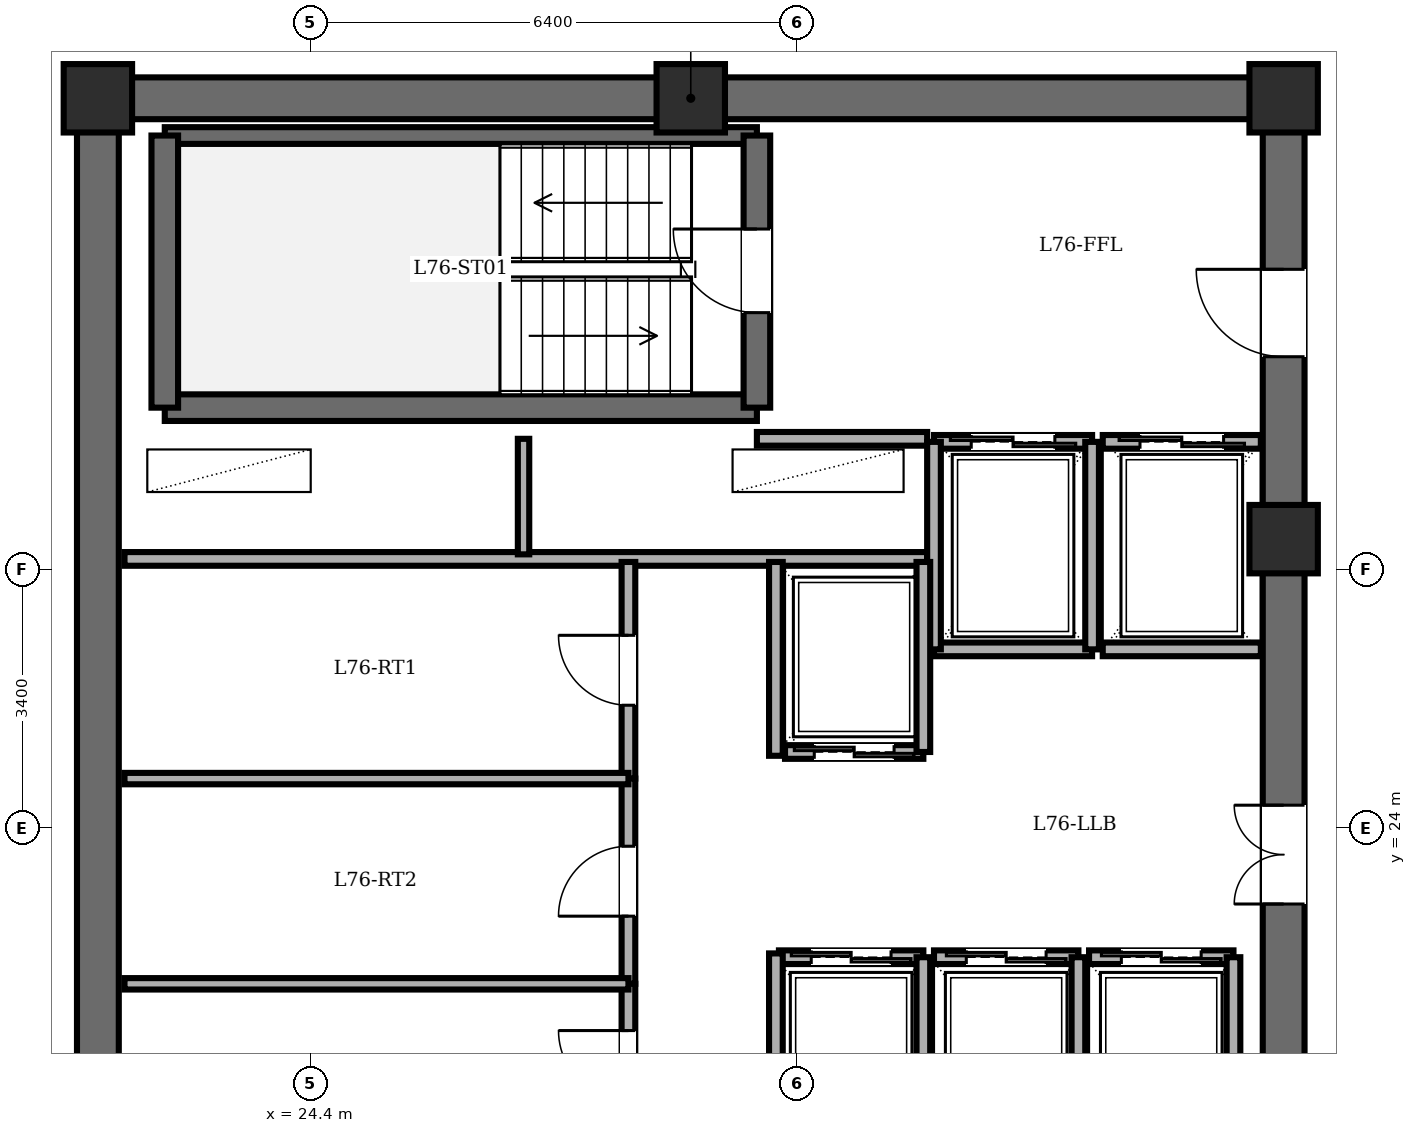
"""IFC4 building model, lengths in metres.
Left out: names, types, materials, properties, quantities, classifications, styles, units other than length and angle.
Written with IfcOpenShell. Run it as: python <this file> out.ifc"""

import sys

from ifc_helpers import new_model, si_unit, direction, frame, frame_2d, origin, origin_2d, place, context, subcontext, project, spatial, rectangle, extrude, element, fill, save


model = new_model("IFC4")
c1 = context("Model", 3, precision=1e-05, world=origin(), true_north=direction((0.0, 1.0)))
c2 = subcontext(c1, "Body", "Model", "MODEL_VIEW")
j1 = project(units=[si_unit("LENGTHUNIT", "METRE"), si_unit("PLANEANGLEUNIT", "RADIAN")], contexts=[c1])
p1 = place(None, origin())
s1 = spatial("IfcSite", under=j1, at=p1, CompositionType="ELEMENT")
p2 = place(p1, origin())
s2 = spatial("IfcBuilding", under=s1, at=p2, CompositionType="ELEMENT")
p3 = place(p2, frame((0.0, 0.0, 291.65)))
s3 = spatial("IfcBuildingStorey", under=s2, at=p3, CompositionType="ELEMENT", Elevation=291.65)
for number, where, z_axis, x_axis in (
    (1, (37.2, 27.8, 0.0), (0.0, 0.0, 1.0), (1.0, 0.0, 0.0)),
    (2, (37.2, 33.6, 0.0), (0.0, 0.0, 1.0), (1.0, 0.0, 0.0)),
    (3, (29.4, 33.6, 0.0), (0.0, 0.0, 1.0), (1.0, 0.0, 0.0)),
    (4, (21.6, 33.6, 0.0), (0.0, 0.0, 1.0), (1.0, 0.0, 0.0)),
):
    element("IfcColumn", number, at=place(p3, frame(where, z_axis=z_axis, x_axis=x_axis)), inside=s3, PredefinedType="COLUMN", context=c2, shape_type="SweptSolid", body=[
        extrude(rectangle(XDim=0.9, YDim=0.9, at=origin_2d()), origin(), (0.0, 0.0, 1.0), 3.65),
    ])
p4 = place(p3, frame((21.6, 14.4, 0.0), z_axis=(0.0, 0.0, 1.0), x_axis=(0.0, 1.0, 0.0)))
e5 = element("IfcWall", 5, at=p4, inside=s3, PredefinedType="SHEAR", context=c2, shape_type="SweptSolid", body=[
    extrude(rectangle(XDim=19.2, YDim=0.55, at=frame_2d((9.6, 0.0))), origin(), (0.0, 0.0, 1.0), 3.41),
])
p5 = place(p3, frame((21.6, 33.6, 0.0), z_axis=(0.0, 0.0, 1.0), x_axis=(1.0, 0.0, 0.0)))
e6 = element("IfcWall", 6, at=p5, inside=s3, PredefinedType="SHEAR", context=c2, shape_type="SweptSolid", body=[
    extrude(rectangle(XDim=15.6, YDim=0.55, at=frame_2d((7.8, 0.0))), origin(), (0.0, 0.0, 1.0), 3.41),
])
p6 = place(p3, frame((37.2, 14.4, 0.0), z_axis=(0.0, 0.0, 1.0), x_axis=(0.0, 1.0, 0.0)))
e7 = element("IfcWall", 7, at=p6, inside=s3, PredefinedType="SHEAR", context=c2, shape_type="SweptSolid", body=[
    extrude(rectangle(XDim=19.2, YDim=0.55, at=frame_2d((9.6, 0.0))), origin(), (0.0, 0.0, 1.0), 3.41),
])
p7 = place(p6, frame((15.8, 0.0, 0.0)))
e8 = element("IfcOpeningElement", 8, at=p7, cuts=e7, PredefinedType="OPENING", context=c2, shape_type="SweptSolid", body=[
    extrude(rectangle(XDim=1.15, YDim=2.15, at=frame_2d((0.575, 1.075))), frame((0.0, 0.285, 0.0), z_axis=(0.0, -1.0, 0.0), x_axis=(1.0, 0.0, 0.0)), (0.0, 0.0, 1.0), 0.57),
])
p8 = place(p6, frame((3.6, 0.0, 0.0)))
e9 = element("IfcOpeningElement", 9, at=p8, cuts=e7, PredefinedType="OPENING", context=c2, shape_type="SweptSolid", body=[
    extrude(rectangle(XDim=1.1, YDim=2.15, at=frame_2d((0.55, 1.075))), frame((0.0, 0.285, 0.0), z_axis=(0.0, -1.0, 0.0), x_axis=(1.0, 0.0, 0.0)), (0.0, 0.0, 1.0), 0.57),
])
p9 = place(p6, frame((8.6, 0.0, 0.0)))
e10 = element("IfcOpeningElement", 10, at=p9, cuts=e7, PredefinedType="OPENING", context=c2, shape_type="SweptSolid", body=[
    extrude(rectangle(XDim=1.3, YDim=2.2, at=frame_2d((0.65, 1.1))), frame((0.0, 0.285, 0.0), z_axis=(0.0, -1.0, 0.0), x_axis=(1.0, 0.0, 0.0)), (0.0, 0.0, 1.0), 0.57),
])
p10 = place(p3, frame((22.48, 29.53, 0.0), z_axis=(0.0, 0.0, 1.0), x_axis=(1.0, 0.0, 0.0)))
e11 = element("IfcWall", 11, at=p10, inside=s3, PredefinedType="SOLIDWALL", context=c2, shape_type="SweptSolid", body=[
    extrude(rectangle(XDim=7.79, YDim=0.35, at=frame_2d((3.895, 0.0))), origin(), (0.0, 0.0, 1.0), 3.41),
])
p11 = place(p3, frame((22.48, 33.11, 0.0), z_axis=(0.0, 0.0, 1.0), x_axis=(1.0, 0.0, 0.0)))
e12 = element("IfcWall", 12, at=p11, inside=s3, PredefinedType="PARTITIONING", context=c2, shape_type="SweptSolid", body=[
    extrude(rectangle(XDim=7.79, YDim=0.22, at=frame_2d((3.895, 0.0))), origin(), (0.0, 0.0, 1.0), 3.41),
])
p12 = place(p3, frame((22.48, 29.53, 0.0), z_axis=(0.0, 0.0, 1.0), x_axis=(0.0, 1.0, 0.0)))
e13 = element("IfcWall", 13, at=p12, inside=s3, PredefinedType="SOLIDWALL", context=c2, shape_type="SweptSolid", body=[
    extrude(rectangle(XDim=3.58, YDim=0.35, at=frame_2d((1.79, 0.0))), origin(), (0.0, 0.0, 1.0), 3.41),
])
p13 = place(p3, frame((30.27, 29.53, 0.0), z_axis=(0.0, 0.0, 1.0), x_axis=(0.0, 1.0, 0.0)))
e14 = element("IfcWall", 14, at=p13, inside=s3, PredefinedType="SOLIDWALL", context=c2, shape_type="SweptSolid", body=[
    extrude(rectangle(XDim=3.58, YDim=0.35, at=frame_2d((1.79, 0.0))), origin(), (0.0, 0.0, 1.0), 3.41),
])
p14 = place(p13, frame((1.25, 0.0, 0.0)))
e15 = element("IfcOpeningElement", 15, at=p14, cuts=e14, PredefinedType="OPENING", context=c2, shape_type="SweptSolid", body=[
    extrude(rectangle(XDim=1.1, YDim=2.15, at=frame_2d((0.55, 1.075))), frame((0.0, 0.185, 0.0), z_axis=(0.0, -1.0, 0.0), x_axis=(1.0, 0.0, 0.0)), (0.0, 0.0, 1.0), 0.37),
])
p15 = place(p3, frame((30.27, 29.12, 0.0), z_axis=(0.0, 0.0, 1.0), x_axis=(1.0, 0.0, 0.0)))
e16 = element("IfcWall", 16, at=p15, inside=s3, PredefinedType="PARTITIONING", context=c2, shape_type="SweptSolid", body=[
    extrude(rectangle(XDim=2.24, YDim=0.18, at=frame_2d((1.12, 0.0))), origin(), (0.0, 0.0, 1.0), 3.41),
])
p16 = place(p3, frame((21.95, 27.54, 0.0), z_axis=(0.0, 0.0, 1.0), x_axis=(1.0, 0.0, 0.0)))
e17 = element("IfcWall", 17, at=p16, inside=s3, PredefinedType="PARTITIONING", context=c2, shape_type="SweptSolid", body=[
    extrude(rectangle(XDim=10.56, YDim=0.18, at=frame_2d((5.28, 0.0))), origin(), (0.0, 0.0, 1.0), 3.41),
])
p17 = place(p3, frame((27.2, 27.6, 0.0), z_axis=(0.0, 0.0, 1.0), x_axis=(0.0, 1.0, 0.0)))
e18 = element("IfcWall", 18, at=p17, inside=s3, PredefinedType="PARTITIONING", context=c2, shape_type="SweptSolid", body=[
    extrude(rectangle(XDim=1.52, YDim=0.15, at=frame_2d((0.76, 0.0))), origin(), (0.0, 0.0, 1.0), 3.41),
])
p18 = place(p3, frame((32.6, 29.08, 0.0), z_axis=(0.0, 0.0, 1.0), x_axis=(1.0, 0.0, 0.0)))
e19 = element("IfcWall", 19, at=p18, inside=s3, PredefinedType="PARTITIONING", context=c2, shape_type="SweptSolid", body=[
    extrude(rectangle(XDim=2.08, YDim=0.18, at=frame_2d((1.04, 0.0))), origin(), (0.0, 0.0, 1.0), 3.41),
])
p19 = place(p18, frame((0.49, 0.0, 0.0)))
e20 = element("IfcOpeningElement", 20, at=p19, cuts=e19, PredefinedType="OPENING", context=c2, shape_type="SweptSolid", body=[
    extrude(rectangle(XDim=1.1, YDim=2.2, at=frame_2d((0.55, 1.1))), frame((0.0, 0.1, 0.0), z_axis=(0.0, -1.0, 0.0), x_axis=(1.0, 0.0, 0.0)), (0.0, 0.0, 1.0), 0.2),
])
p20 = place(p3, frame((34.68, 26.35, 0.0), z_axis=(0.0, 0.0, 1.0), x_axis=(-1.0, 0.0, 0.0)))
e21 = element("IfcWall", 21, at=p20, inside=s3, PredefinedType="PARTITIONING", context=c2, shape_type="SweptSolid", body=[
    extrude(rectangle(XDim=2.08, YDim=0.18, at=frame_2d((1.04, 0.0))), origin(), (0.0, 0.0, 1.0), 3.41),
])
for number, where, z_axis, x_axis in (
    (22, (34.68, 26.35, 0.0), (0.0, 0.0, 1.0), (0.0, 1.0, 0.0)),
    (23, (32.6, 29.08, 0.0), (0.0, 0.0, 1.0), (0.0, -1.0, 0.0)),
):
    element("IfcWall", number, at=place(p3, frame(where, z_axis=z_axis, x_axis=x_axis)), inside=s3, PredefinedType="PARTITIONING", context=c2, shape_type="SweptSolid", body=[
        extrude(rectangle(XDim=2.73, YDim=0.18, at=frame_2d((1.365, 0.0))), origin(), (0.0, 0.0, 1.0), 3.41),
    ])
p21 = place(p3, frame((34.82, 29.08, 0.0), z_axis=(0.0, 0.0, 1.0), x_axis=(1.0, 0.0, 0.0)))
e24 = element("IfcWall", 24, at=p21, inside=s3, PredefinedType="PARTITIONING", context=c2, shape_type="SweptSolid", body=[
    extrude(rectangle(XDim=2.08, YDim=0.18, at=frame_2d((1.04, 0.0))), origin(), (0.0, 0.0, 1.0), 3.41),
])
p22 = place(p21, frame((0.49, 0.0, 0.0)))
e25 = element("IfcOpeningElement", 25, at=p22, cuts=e24, PredefinedType="OPENING", context=c2, shape_type="SweptSolid", body=[
    extrude(rectangle(XDim=1.1, YDim=2.2, at=frame_2d((0.55, 1.1))), frame((0.0, 0.1, 0.0), z_axis=(0.0, -1.0, 0.0), x_axis=(1.0, 0.0, 0.0)), (0.0, 0.0, 1.0), 0.2),
])
p23 = place(p3, frame((36.9, 26.35, 0.0), z_axis=(0.0, 0.0, 1.0), x_axis=(-1.0, 0.0, 0.0)))
e26 = element("IfcWall", 26, at=p23, inside=s3, PredefinedType="PARTITIONING", context=c2, shape_type="SweptSolid", body=[
    extrude(rectangle(XDim=2.08, YDim=0.18, at=frame_2d((1.04, 0.0))), origin(), (0.0, 0.0, 1.0), 3.41),
])
p24 = place(p3, frame((32.46, 25.0, 0.0), z_axis=(0.0, 0.0, 1.0), x_axis=(-1.0, 0.0, 0.0)))
e27 = element("IfcWall", 27, at=p24, inside=s3, PredefinedType="PARTITIONING", context=c2, shape_type="SweptSolid", body=[
    extrude(rectangle(XDim=1.82, YDim=0.18, at=frame_2d((0.91, 0.0))), origin(), (0.0, 0.0, 1.0), 3.41),
])
p25 = place(p24, frame((0.385, 0.0, 0.0)))
e28 = element("IfcOpeningElement", 28, at=p25, cuts=e27, PredefinedType="OPENING", context=c2, shape_type="SweptSolid", body=[
    extrude(rectangle(XDim=1.05, YDim=2.2, at=frame_2d((0.525, 1.1))), frame((0.0, 0.1, 0.0), z_axis=(0.0, -1.0, 0.0), x_axis=(1.0, 0.0, 0.0)), (0.0, 0.0, 1.0), 0.2),
])
p26 = place(p3, frame((32.46, 25.0, 0.0), z_axis=(0.0, 0.0, 1.0), x_axis=(0.0, 1.0, 0.0)))
e29 = element("IfcWall", 29, at=p26, inside=s3, PredefinedType="PARTITIONING", context=c2, shape_type="SweptSolid", body=[
    extrude(rectangle(XDim=2.5, YDim=0.18, at=frame_2d((1.25, 0.0))), origin(), (0.0, 0.0, 1.0), 3.41),
])
p27 = place(p3, frame((30.56, 22.3, 0.0), z_axis=(0.0, 0.0, 1.0), x_axis=(1.0, 0.0, 0.0)))
e30 = element("IfcWall", 30, at=p27, inside=s3, PredefinedType="PARTITIONING", context=c2, shape_type="SweptSolid", body=[
    extrude(rectangle(XDim=1.9, YDim=0.18, at=frame_2d((0.95, 0.0))), origin(), (0.0, 0.0, 1.0), 3.41),
])
p28 = place(p27, frame((0.425, 0.0, 0.0)))
e31 = element("IfcOpeningElement", 31, at=p28, cuts=e30, PredefinedType="OPENING", context=c2, shape_type="SweptSolid", body=[
    extrude(rectangle(XDim=1.05, YDim=2.2, at=frame_2d((0.525, 1.1))), frame((0.0, 0.1, 0.0), z_axis=(0.0, -1.0, 0.0), x_axis=(1.0, 0.0, 0.0)), (0.0, 0.0, 1.0), 0.2),
])
p29 = place(p3, frame((32.46, 19.8, 0.0), z_axis=(0.0, 0.0, 1.0), x_axis=(0.0, 1.0, 0.0)))
e32 = element("IfcWall", 32, at=p29, inside=s3, PredefinedType="PARTITIONING", context=c2, shape_type="SweptSolid", body=[
    extrude(rectangle(XDim=2.5, YDim=0.18, at=frame_2d((1.25, 0.0))), origin(), (0.0, 0.0, 1.0), 3.41),
])
p30 = place(p3, frame((32.6, 22.3, 0.0), z_axis=(0.0, 0.0, 1.0), x_axis=(1.0, 0.0, 0.0)))
e33 = element("IfcWall", 33, at=p30, inside=s3, PredefinedType="PARTITIONING", context=c2, shape_type="SweptSolid", body=[
    extrude(rectangle(XDim=1.9, YDim=0.18, at=frame_2d((0.95, 0.0))), origin(), (0.0, 0.0, 1.0), 3.41),
])
p31 = place(p30, frame((0.425, 0.0, 0.0)))
e34 = element("IfcOpeningElement", 34, at=p31, cuts=e33, PredefinedType="OPENING", context=c2, shape_type="SweptSolid", body=[
    extrude(rectangle(XDim=1.05, YDim=2.2, at=frame_2d((0.525, 1.1))), frame((0.0, 0.1, 0.0), z_axis=(0.0, -1.0, 0.0), x_axis=(1.0, 0.0, 0.0)), (0.0, 0.0, 1.0), 0.2),
])
p32 = place(p3, frame((34.5, 19.8, 0.0), z_axis=(0.0, 0.0, 1.0), x_axis=(0.0, 1.0, 0.0)))
e35 = element("IfcWall", 35, at=p32, inside=s3, PredefinedType="PARTITIONING", context=c2, shape_type="SweptSolid", body=[
    extrude(rectangle(XDim=2.5, YDim=0.18, at=frame_2d((1.25, 0.0))), origin(), (0.0, 0.0, 1.0), 3.41),
])
p33 = place(p3, frame((34.64, 22.3, 0.0), z_axis=(0.0, 0.0, 1.0), x_axis=(1.0, 0.0, 0.0)))
e36 = element("IfcWall", 36, at=p33, inside=s3, PredefinedType="PARTITIONING", context=c2, shape_type="SweptSolid", body=[
    extrude(rectangle(XDim=1.9, YDim=0.18, at=frame_2d((0.95, 0.0))), origin(), (0.0, 0.0, 1.0), 3.41),
])
p34 = place(p33, frame((0.425, 0.0, 0.0)))
e37 = element("IfcOpeningElement", 37, at=p34, cuts=e36, PredefinedType="OPENING", context=c2, shape_type="SweptSolid", body=[
    extrude(rectangle(XDim=1.05, YDim=2.2, at=frame_2d((0.525, 1.1))), frame((0.0, 0.1, 0.0), z_axis=(0.0, -1.0, 0.0), x_axis=(1.0, 0.0, 0.0)), (0.0, 0.0, 1.0), 0.2),
])
p35 = place(p3, frame((36.54, 19.8, 0.0), z_axis=(0.0, 0.0, 1.0), x_axis=(0.0, 1.0, 0.0)))
e38 = element("IfcWall", 38, at=p35, inside=s3, PredefinedType="PARTITIONING", context=c2, shape_type="SweptSolid", body=[
    extrude(rectangle(XDim=2.5, YDim=0.18, at=frame_2d((1.25, 0.0))), origin(), (0.0, 0.0, 1.0), 3.41),
])
for number, where, z_axis, x_axis in (
    (39, (30.52, 24.95, 0.0), (0.0, 0.0, 1.0), (0.0, 1.0, 0.0)),
    (40, (30.52, 19.8, 0.0), (0.0, 0.0, 1.0), (0.0, 1.0, 0.0)),
):
    element("IfcWall", number, at=place(p3, frame(where, z_axis=z_axis, x_axis=x_axis)), inside=s3, PredefinedType="PARTITIONING", context=c2, shape_type="SweptSolid", body=[
        extrude(rectangle(XDim=2.55, YDim=0.18, at=frame_2d((1.275, 0.0))), origin(), (0.0, 0.0, 1.0), 3.41),
    ])
p36 = place(p3, frame((28.58, 24.65, 0.0), z_axis=(0.0, 0.0, 1.0), x_axis=(0.0, 1.0, 0.0)))
e41 = element("IfcWall", 41, at=p36, inside=s3, PredefinedType="PARTITIONING", context=c2, shape_type="SweptSolid", body=[
    extrude(rectangle(XDim=2.85, YDim=0.18, at=frame_2d((1.425, 0.0))), origin(), (0.0, 0.0, 1.0), 3.41),
])
p37 = place(p36, frame((0.965, 0.0, 0.0)))
e42 = element("IfcOpeningElement", 42, at=p37, cuts=e41, PredefinedType="OPENING", context=c2, shape_type="SweptSolid", body=[
    extrude(rectangle(XDim=0.92, YDim=2.1, at=frame_2d((0.46, 1.05))), frame((0.0, 0.1, 0.0), z_axis=(0.0, -1.0, 0.0), x_axis=(1.0, 0.0, 0.0)), (0.0, 0.0, 1.0), 0.2),
])
p38 = place(p3, frame((28.58, 21.95, 0.0), z_axis=(0.0, 0.0, 1.0), x_axis=(0.0, 1.0, 0.0)))
e43 = element("IfcWall", 43, at=p38, inside=s3, PredefinedType="PARTITIONING", context=c2, shape_type="SweptSolid", body=[
    extrude(rectangle(XDim=2.7, YDim=0.18, at=frame_2d((1.35, 0.0))), origin(), (0.0, 0.0, 1.0), 3.41),
])
p39 = place(p38, frame((0.89, 0.0, 0.0)))
e44 = element("IfcOpeningElement", 44, at=p39, cuts=e43, PredefinedType="OPENING", context=c2, shape_type="SweptSolid", body=[
    extrude(rectangle(XDim=0.92, YDim=2.1, at=frame_2d((0.46, 1.05))), frame((0.0, 0.1, 0.0), z_axis=(0.0, -1.0, 0.0), x_axis=(1.0, 0.0, 0.0)), (0.0, 0.0, 1.0), 0.2),
])
p40 = place(p3, frame((28.58, 19.8, 0.0), z_axis=(0.0, 0.0, 1.0), x_axis=(0.0, 1.0, 0.0)))
e45 = element("IfcWall", 45, at=p40, inside=s3, PredefinedType="PARTITIONING", context=c2, shape_type="SweptSolid", body=[
    extrude(rectangle(XDim=2.15, YDim=0.18, at=frame_2d((1.075, 0.0))), origin(), (0.0, 0.0, 1.0), 3.41),
])
p41 = place(p40, frame((0.615, 0.0, 0.0)))
e46 = element("IfcOpeningElement", 46, at=p41, cuts=e45, PredefinedType="OPENING", context=c2, shape_type="SweptSolid", body=[
    extrude(rectangle(XDim=0.92, YDim=2.1, at=frame_2d((0.46, 1.05))), frame((0.0, 0.1, 0.0), z_axis=(0.0, -1.0, 0.0), x_axis=(1.0, 0.0, 0.0)), (0.0, 0.0, 1.0), 0.2),
])
for number, where, z_axis, x_axis in (
    (47, (21.95, 24.65, 0.0), (0.0, 0.0, 1.0), (1.0, 0.0, 0.0)),
    (48, (21.95, 21.95, 0.0), (0.0, 0.0, 1.0), (1.0, 0.0, 0.0)),
):
    element("IfcWall", number, at=place(p3, frame(where, z_axis=z_axis, x_axis=x_axis)), inside=s3, PredefinedType="PARTITIONING", context=c2, shape_type="SweptSolid", body=[
        extrude(rectangle(XDim=6.63, YDim=0.15, at=frame_2d((3.315, 0.0))), origin(), (0.0, 0.0, 1.0), 3.41),
    ])
p42 = place(p14, origin())
e49 = element("IfcDoor", 49, at=p42, inside=s3, OperationType="SINGLE_SWING_RIGHT", PredefinedType="DOOR", context=c2, shape_type="SweptSolid", body=[
    extrude(rectangle(XDim=1.1, YDim=2.15, at=frame_2d((0.55, 1.075))), frame((0.0, 0.025, 0.0), z_axis=(0.0, -1.0, 0.0), x_axis=(1.0, 0.0, 0.0)), (0.0, 0.0, 1.0), 0.05),
])
fill(e15, e49)
p43 = place(p7, origin())
e50 = element("IfcDoor", 50, at=p43, inside=s3, OperationType="SINGLE_SWING_RIGHT", PredefinedType="DOOR", context=c2, shape_type="SweptSolid", body=[
    extrude(rectangle(XDim=1.15, YDim=2.15, at=frame_2d((0.575, 1.075))), frame((0.0, 0.025, 0.0), z_axis=(0.0, -1.0, 0.0), x_axis=(1.0, 0.0, 0.0)), (0.0, 0.0, 1.0), 0.05),
])
fill(e8, e50)
p44 = place(p19, origin())
e51 = element("IfcDoor", 51, at=p44, inside=s3, OperationType="DOUBLE_DOOR_SLIDING", PredefinedType="DOOR", context=c2, shape_type="SweptSolid", body=[
    extrude(rectangle(XDim=1.1, YDim=2.2, at=frame_2d((0.55, 1.1))), frame((0.0, 0.025, 0.0), z_axis=(0.0, -1.0, 0.0), x_axis=(1.0, 0.0, 0.0)), (0.0, 0.0, 1.0), 0.05),
])
fill(e20, e51)
p45 = place(p22, origin())
e52 = element("IfcDoor", 52, at=p45, inside=s3, OperationType="DOUBLE_DOOR_SLIDING", PredefinedType="DOOR", context=c2, shape_type="SweptSolid", body=[
    extrude(rectangle(XDim=1.1, YDim=2.2, at=frame_2d((0.55, 1.1))), frame((0.0, 0.025, 0.0), z_axis=(0.0, -1.0, 0.0), x_axis=(1.0, 0.0, 0.0)), (0.0, 0.0, 1.0), 0.05),
])
fill(e25, e52)
p46 = place(p25, origin())
e53 = element("IfcDoor", 53, at=p46, inside=s3, OperationType="DOUBLE_DOOR_SLIDING", PredefinedType="DOOR", context=c2, shape_type="SweptSolid", body=[
    extrude(rectangle(XDim=1.05, YDim=2.2, at=frame_2d((0.525, 1.1))), frame((0.0, 0.025, 0.0), z_axis=(0.0, -1.0, 0.0), x_axis=(1.0, 0.0, 0.0)), (0.0, 0.0, 1.0), 0.05),
])
fill(e28, e53)
p47 = place(p28, origin())
e54 = element("IfcDoor", 54, at=p47, inside=s3, OperationType="DOUBLE_DOOR_SLIDING", PredefinedType="DOOR", context=c2, shape_type="SweptSolid", body=[
    extrude(rectangle(XDim=1.05, YDim=2.2, at=frame_2d((0.525, 1.1))), frame((0.0, 0.025, 0.0), z_axis=(0.0, -1.0, 0.0), x_axis=(1.0, 0.0, 0.0)), (0.0, 0.0, 1.0), 0.05),
])
fill(e31, e54)
p48 = place(p31, origin())
e55 = element("IfcDoor", 55, at=p48, inside=s3, OperationType="DOUBLE_DOOR_SLIDING", PredefinedType="DOOR", context=c2, shape_type="SweptSolid", body=[
    extrude(rectangle(XDim=1.05, YDim=2.2, at=frame_2d((0.525, 1.1))), frame((0.0, 0.025, 0.0), z_axis=(0.0, -1.0, 0.0), x_axis=(1.0, 0.0, 0.0)), (0.0, 0.0, 1.0), 0.05),
])
fill(e34, e55)
p49 = place(p34, origin())
e56 = element("IfcDoor", 56, at=p49, inside=s3, OperationType="DOUBLE_DOOR_SLIDING", PredefinedType="DOOR", context=c2, shape_type="SweptSolid", body=[
    extrude(rectangle(XDim=1.05, YDim=2.2, at=frame_2d((0.525, 1.1))), frame((0.0, 0.025, 0.0), z_axis=(0.0, -1.0, 0.0), x_axis=(1.0, 0.0, 0.0)), (0.0, 0.0, 1.0), 0.05),
])
fill(e37, e56)
p50 = place(p37, origin())
e57 = element("IfcDoor", 57, at=p50, inside=s3, OperationType="SINGLE_SWING_RIGHT", PredefinedType="DOOR", context=c2, shape_type="SweptSolid", body=[
    extrude(rectangle(XDim=0.92, YDim=2.1, at=frame_2d((0.46, 1.05))), frame((0.0, 0.025, 0.0), z_axis=(0.0, -1.0, 0.0), x_axis=(1.0, 0.0, 0.0)), (0.0, 0.0, 1.0), 0.05),
])
fill(e42, e57)
p51 = place(p39, origin())
e58 = element("IfcDoor", 58, at=p51, inside=s3, OperationType="SINGLE_SWING_LEFT", PredefinedType="DOOR", context=c2, shape_type="SweptSolid", body=[
    extrude(rectangle(XDim=0.92, YDim=2.1, at=frame_2d((0.46, 1.05))), frame((0.0, 0.025, 0.0), z_axis=(0.0, -1.0, 0.0), x_axis=(1.0, 0.0, 0.0)), (0.0, 0.0, 1.0), 0.05),
])
fill(e44, e58)
p52 = place(p41, origin())
e59 = element("IfcDoor", 59, at=p52, inside=s3, OperationType="SINGLE_SWING_RIGHT", PredefinedType="DOOR", context=c2, shape_type="SweptSolid", body=[
    extrude(rectangle(XDim=0.92, YDim=2.1, at=frame_2d((0.46, 1.05))), frame((0.0, 0.025, 0.0), z_axis=(0.0, -1.0, 0.0), x_axis=(1.0, 0.0, 0.0)), (0.0, 0.0, 1.0), 0.05),
])
fill(e46, e59)
p53 = place(p9, origin())
e60 = element("IfcDoor", 60, at=p53, inside=s3, OperationType="DOUBLE_DOOR_SINGLE_SWING", PredefinedType="DOOR", context=c2, shape_type="SweptSolid", body=[
    extrude(rectangle(XDim=1.3, YDim=2.2, at=frame_2d((0.65, 1.1))), frame((0.0, 0.025, 0.0), z_axis=(0.0, -1.0, 0.0), x_axis=(1.0, 0.0, 0.0)), (0.0, 0.0, 1.0), 0.05),
])
fill(e10, e60)
save(model, sys.argv[1])
